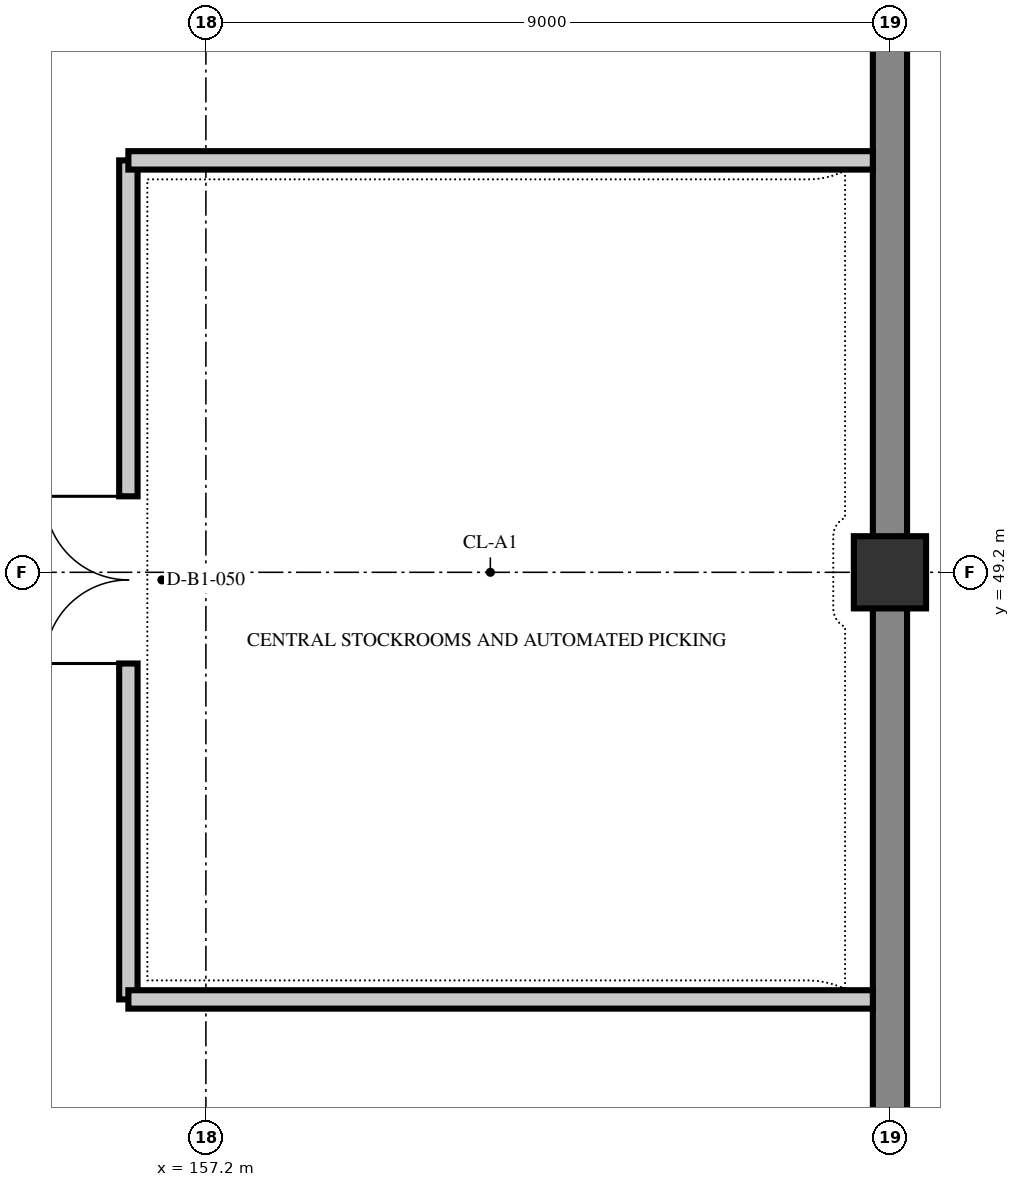
"""IFC4 building model, lengths in metres.
Left out: names, types, materials, properties, quantities, classifications, styles, units other than length and angle.
Written with IfcOpenShell. Run it as: python <this file> out.ifc"""

import sys

from ifc_helpers import new_model, si_unit, direction, frame, frame_2d, origin, origin_2d, place, context, subcontext, project, spatial, rectangle, extrude, element, fill, save


model = new_model("IFC4")
c1 = context("Model", 3, precision=1e-05, world=origin(), true_north=direction((0.0, 1.0)))
c2 = subcontext(c1, "Body", "Model", "MODEL_VIEW")
j1 = project(units=[si_unit("LENGTHUNIT", "METRE"), si_unit("PLANEANGLEUNIT", "RADIAN")], contexts=[c1])
p1 = place(None, origin())
s1 = spatial("IfcSite", under=j1, at=p1, CompositionType="ELEMENT")
p2 = place(p1, origin())
s2 = spatial("IfcBuilding", under=s1, at=p2, CompositionType="ELEMENT")
p3 = place(p2, frame((0.0, 0.0, -4.8)))
s3 = spatial("IfcBuildingStorey", under=s2, at=p3, CompositionType="ELEMENT", Elevation=-4.8)
p4 = place(p3, frame((166.2, 49.2, 0.0), z_axis=(0.0, 0.0, 1.0), x_axis=(1.0, 0.0, 0.0)))
e1 = element("IfcColumn", 1, at=p4, inside=s3, PredefinedType="COLUMN", context=c2, shape_type="SweptSolid", body=[
    extrude(rectangle(XDim=0.95, YDim=0.95, at=origin_2d()), origin(), (0.0, 0.0, 1.0), 4.8),
])
p5 = place(p3, frame((166.2, 98.5, 0.0), z_axis=(0.0, 0.0, 1.0), x_axis=(0.0, -1.0, 0.0)))
e2 = element("IfcWall", 2, at=p5, inside=s3, PredefinedType="USERDEFINED", context=c2, shape_type="SweptSolid", body=[
    extrude(rectangle(XDim=60.1, YDim=0.45, at=frame_2d((30.05, 0.0))), origin(), (0.0, 0.0, 1.0), 4.5),
])
p6 = place(p3, frame((156.18, 43.58, 0.0), z_axis=(0.0, 0.0, 1.0), x_axis=(0.0, 1.0, 0.0)))
e3 = element("IfcWall", 3, at=p6, inside=s3, PredefinedType="PARTITIONING", context=c2, shape_type="SweptSolid", body=[
    extrude(rectangle(XDim=11.04, YDim=0.242, at=frame_2d((5.52, 0.0))), origin(), (0.0, 0.0, 1.0), 4.5),
])
p7 = place(p6, frame((4.42, 0.0, 0.0)))
e4 = element("IfcOpeningElement", 4, at=p7, cuts=e3, PredefinedType="OPENING", context=c2, shape_type="SweptSolid", body=[
    extrude(rectangle(XDim=2.2, YDim=2.5, at=frame_2d((1.1, 1.25))), frame((0.0, 0.133, 0.0), z_axis=(0.0, -1.0, 0.0), x_axis=(1.0, 0.0, 0.0)), (0.0, 0.0, 1.0), 0.266),
])
for number, where, z_axis, x_axis in (
    (5, (156.18, 54.62, 0.0), (0.0, 0.0, 1.0), (1.0, 0.0, 0.0)),
    (6, (165.975, 43.58, 0.0), (0.0, 0.0, 1.0), (-1.0, 0.0, 0.0)),
):
    element("IfcWall", number, at=place(p3, frame(where, z_axis=z_axis, x_axis=x_axis)), inside=s3, PredefinedType="PARTITIONING", context=c2, shape_type="SweptSolid", body=[
        extrude(rectangle(XDim=9.795, YDim=0.242, at=frame_2d((4.897, 0.0))), origin(), (0.0, 0.0, 1.0), 4.5),
    ])
p8 = place(p7, origin())
e7 = element("IfcDoor", 7, at=p8, inside=s3, OperationType="DOUBLE_DOOR_SINGLE_SWING", PredefinedType="DOOR", context=c2, shape_type="SweptSolid", body=[
    extrude(rectangle(XDim=2.2, YDim=2.5, at=frame_2d((1.1, 1.25))), frame((0.0, 0.025, 0.0), z_axis=(0.0, -1.0, 0.0), x_axis=(1.0, 0.0, 0.0)), (0.0, 0.0, 1.0), 0.05),
])
fill(e4, e7)
save(model, sys.argv[1])
